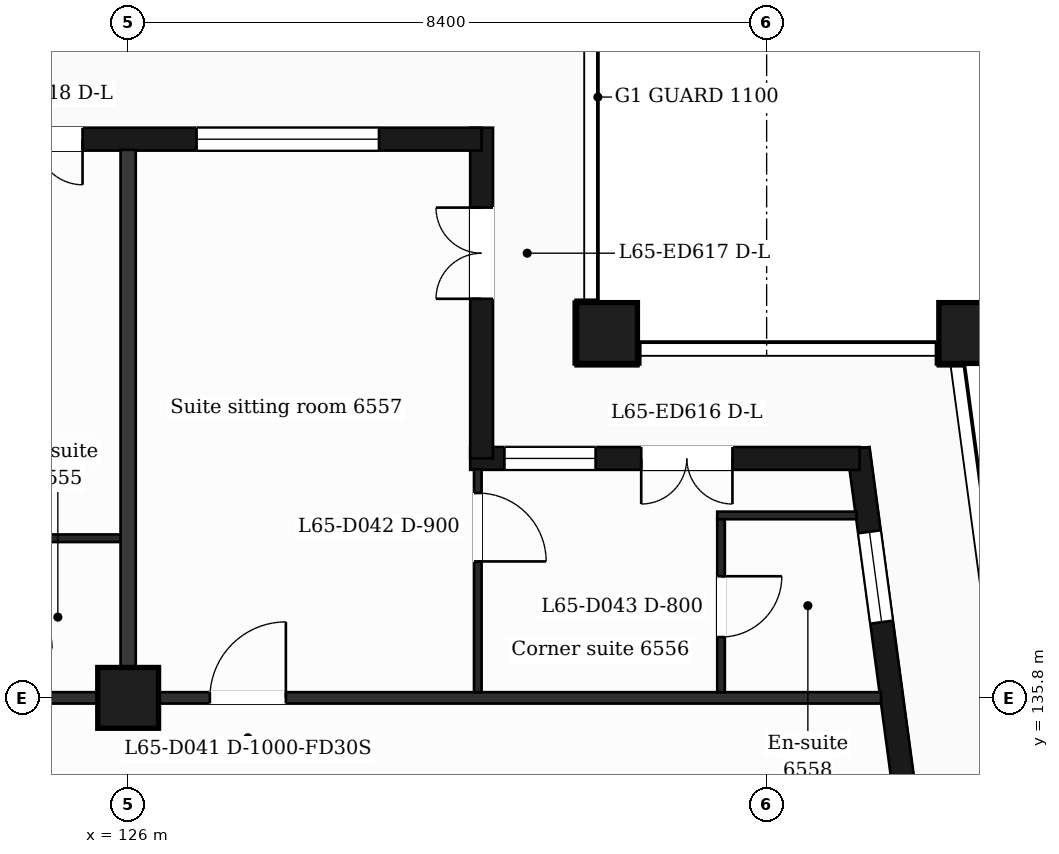
"""IFC4 building model, lengths in metres.
Left out: names, types, materials, properties, quantities, classifications, styles, units other than length and angle.
Written with IfcOpenShell. Run it as: python <this file> out.ifc"""

import sys

from ifc_helpers import new_model, si_unit, direction, frame, frame_2d, origin, origin_2d, place, context, subcontext, project, spatial, rectangle, extrude, element, fill, save


model = new_model("IFC4")
c1 = context("Model", 3, precision=1e-05, world=origin(), true_north=direction((0.0, 1.0)))
c2 = subcontext(c1, "Body", "Model", "MODEL_VIEW")
j1 = project(units=[si_unit("LENGTHUNIT", "METRE"), si_unit("PLANEANGLEUNIT", "RADIAN")], contexts=[c1])
p1 = place(None, origin())
s1 = spatial("IfcSite", under=j1, at=p1, CompositionType="ELEMENT")
p2 = place(p1, origin())
s2 = spatial("IfcBuilding", under=s1, at=p2, CompositionType="ELEMENT")
p3 = place(p2, frame((0.0, 0.0, 270.1)))
s3 = spatial("IfcBuildingStorey", under=s2, at=p3, CompositionType="ELEMENT", Elevation=270.1)
for number, where, z_axis, x_axis in (
    (1, (132.3, 140.6, 0.0), (0.0, 0.0, 1.0), (1.0, 0.0, 0.0)),
    (2, (137.065, 140.6, 0.0), (0.0, 0.0, 1.0), (1.0, 0.0, 0.0)),
    (3, (126.0, 135.8, 0.0), (0.0, 0.0, 1.0), (1.0, 0.0, 0.0)),
):
    element("IfcColumn", number, at=place(p3, frame(where, z_axis=z_axis, x_axis=x_axis)), inside=s3, PredefinedType="COLUMN", context=c2, shape_type="SweptSolid", body=[
        extrude(rectangle(XDim=0.8, YDim=0.8, at=origin_2d()), origin(), (0.0, 0.0, 1.0), 3.7),
    ])
p4 = place(p3, frame((136.504, 132.4, 0.0), z_axis=(0.0, 0.0, 1.0), x_axis=(-0.133399697462, 0.99106231929, 0.0)))
e4 = element("IfcWall", 4, at=p4, inside=s3, PredefinedType="SOLIDWALL", context=c2, shape_type="SweptSolid", body=[
    extrude(rectangle(XDim=6.74, YDim=0.3, at=frame_2d((3.37, 0.0))), origin(), (0.0, 0.0, 1.0), 3.38),
])
p5 = place(p4, frame((1.115, 0.0, 0.0)))
e5 = element("IfcOpeningElement", 5, at=p5, cuts=e4, PredefinedType="OPENING", context=c2, shape_type="SweptSolid", body=[
    extrude(rectangle(XDim=1.2, YDim=2.4, at=frame_2d((0.6, 1.2))), frame((0.0, 0.16, 0.0), z_axis=(0.0, -1.0, 0.0), x_axis=(1.0, 0.0, 0.0)), (0.0, 0.0, 1.0), 0.32),
])
p6 = place(p4, frame((4.436, 0.0, 0.9)))
e6 = element("IfcOpeningElement", 6, at=p6, cuts=e4, PredefinedType="OPENING", context=c2, shape_type="SweptSolid", body=[
    extrude(rectangle(XDim=1.2, YDim=2.1, at=frame_2d((0.6, 1.05))), frame((0.0, 0.16, 0.0), z_axis=(0.0, -1.0, 0.0), x_axis=(1.0, 0.0, 0.0)), (0.0, 0.0, 1.0), 0.32),
])
p7 = place(p3, frame((135.623, 138.95, 0.0), z_axis=(0.0, 0.0, 1.0), x_axis=(-1.0, 0.0, 0.0)))
e7 = element("IfcWall", 7, at=p7, inside=s3, PredefinedType="SOLIDWALL", context=c2, shape_type="SweptSolid", body=[
    extrude(rectangle(XDim=5.123, YDim=0.3, at=frame_2d((2.561, 0.0))), origin(), (0.0, 0.0, 1.0), 3.38),
])
p8 = place(p7, frame((1.673, 0.0, 0.0)))
e8 = element("IfcOpeningElement", 8, at=p8, cuts=e7, PredefinedType="OPENING", context=c2, shape_type="SweptSolid", body=[
    extrude(rectangle(XDim=1.2, YDim=2.4, at=frame_2d((0.6, 1.2))), frame((0.0, 0.16, 0.0), z_axis=(0.0, -1.0, 0.0), x_axis=(1.0, 0.0, 0.0)), (0.0, 0.0, 1.0), 0.32),
])
p9 = place(p7, frame((3.473, 0.0, 0.9)))
e9 = element("IfcOpeningElement", 9, at=p9, cuts=e7, PredefinedType="OPENING", context=c2, shape_type="SweptSolid", body=[
    extrude(rectangle(XDim=1.2, YDim=2.1, at=frame_2d((0.6, 1.05))), frame((0.0, 0.16, 0.0), z_axis=(0.0, -1.0, 0.0), x_axis=(1.0, 0.0, 0.0)), (0.0, 0.0, 1.0), 0.32),
])
p10 = place(p3, frame((130.65, 138.95, 0.0), z_axis=(0.0, 0.0, 1.0), x_axis=(0.0, 1.0, 0.0)))
e10 = element("IfcWall", 10, at=p10, inside=s3, PredefinedType="SOLIDWALL", context=c2, shape_type="SweptSolid", body=[
    extrude(rectangle(XDim=4.35, YDim=0.3, at=frame_2d((2.175, 0.0))), origin(), (0.0, 0.0, 1.0), 3.38),
])
p11 = place(p10, frame((2.1, 0.0, 0.0)))
e11 = element("IfcOpeningElement", 11, at=p11, cuts=e10, PredefinedType="OPENING", context=c2, shape_type="SweptSolid", body=[
    extrude(rectangle(XDim=1.2, YDim=2.4, at=frame_2d((0.6, 1.2))), frame((0.0, 0.16, 0.0), z_axis=(0.0, -1.0, 0.0), x_axis=(1.0, 0.0, 0.0)), (0.0, 0.0, 1.0), 0.32),
])
p12 = place(p3, frame((130.65, 143.15, 0.0), z_axis=(0.0, 0.0, 1.0), x_axis=(-1.0, 0.0, 0.0)))
e12 = element("IfcWall", 12, at=p12, inside=s3, PredefinedType="SOLIDWALL", context=c2, shape_type="SweptSolid", body=[
    extrude(rectangle(XDim=14.25, YDim=0.3, at=frame_2d((7.125, 0.0))), origin(), (0.0, 0.0, 1.0), 3.38),
])
p13 = place(p12, frame((1.35, 0.0, 0.9)))
e13 = element("IfcOpeningElement", 13, at=p13, cuts=e12, PredefinedType="OPENING", context=c2, shape_type="SweptSolid", body=[
    extrude(rectangle(XDim=2.4, YDim=2.1, at=frame_2d((1.2, 1.05))), frame((0.0, 0.16, 0.0), z_axis=(0.0, -1.0, 0.0), x_axis=(1.0, 0.0, 0.0)), (0.0, 0.0, 1.0), 0.32),
])
p14 = place(p12, frame((5.25, 0.0, 0.0)))
e14 = element("IfcOpeningElement", 14, at=p14, cuts=e12, PredefinedType="OPENING", context=c2, shape_type="SweptSolid", body=[
    extrude(rectangle(XDim=1.2, YDim=2.4, at=frame_2d((0.6, 1.2))), frame((0.0, 0.16, 0.0), z_axis=(0.0, -1.0, 0.0), x_axis=(1.0, 0.0, 0.0)), (0.0, 0.0, 1.0), 0.32),
])
p15 = place(p12, frame((7.05, 0.0, 0.9)))
e15 = element("IfcOpeningElement", 15, at=p15, cuts=e12, PredefinedType="OPENING", context=c2, shape_type="SweptSolid", body=[
    extrude(rectangle(XDim=1.2, YDim=2.1, at=frame_2d((0.6, 1.05))), frame((0.0, 0.16, 0.0), z_axis=(0.0, -1.0, 0.0), x_axis=(1.0, 0.0, 0.0)), (0.0, 0.0, 1.0), 0.32),
])
p16 = place(p12, frame((10.35, 0.0, 0.9)))
e16 = element("IfcOpeningElement", 16, at=p16, cuts=e12, PredefinedType="OPENING", context=c2, shape_type="SweptSolid", body=[
    extrude(rectangle(XDim=1.2, YDim=2.1, at=frame_2d((0.6, 1.05))), frame((0.0, 0.16, 0.0), z_axis=(0.0, -1.0, 0.0), x_axis=(1.0, 0.0, 0.0)), (0.0, 0.0, 1.0), 0.32),
])
p17 = place(p3, frame((90.895, 135.8, 0.0), z_axis=(0.0, 0.0, 1.0), x_axis=(1.0, 0.0, 0.0)))
e17 = element("IfcWall", 17, at=p17, inside=s3, PredefinedType="PARTITIONING", context=c2, shape_type="SweptSolid", body=[
    extrude(rectangle(XDim=45.011, YDim=0.15, at=frame_2d((22.505, 0.0))), origin(), (0.0, 0.0, 1.0), 3.38),
])
p18 = place(p17, frame((8.005, 0.0, 0.0)))
e18 = element("IfcOpeningElement", 18, at=p18, cuts=e17, PredefinedType="OPENING", context=c2, shape_type="SweptSolid", body=[
    extrude(rectangle(XDim=1.0, YDim=2.1, at=frame_2d((0.5, 1.05))), frame((0.0, 0.085, 0.0), z_axis=(0.0, -1.0, 0.0), x_axis=(1.0, 0.0, 0.0)), (0.0, 0.0, 1.0), 0.17),
])
p19 = place(p17, frame((10.515, 0.0, 0.0)))
e19 = element("IfcOpeningElement", 19, at=p19, cuts=e17, PredefinedType="OPENING", context=c2, shape_type="SweptSolid", body=[
    extrude(rectangle(XDim=1.0, YDim=2.1, at=frame_2d((0.5, 1.05))), frame((0.0, 0.085, 0.0), z_axis=(0.0, -1.0, 0.0), x_axis=(1.0, 0.0, 0.0)), (0.0, 0.0, 1.0), 0.17),
])
p20 = place(p17, frame((20.156, 0.0, 0.0)))
e20 = element("IfcOpeningElement", 20, at=p20, cuts=e17, PredefinedType="OPENING", context=c2, shape_type="SweptSolid", body=[
    extrude(rectangle(XDim=1.0, YDim=2.1, at=frame_2d((0.5, 1.05))), frame((0.0, 0.085, 0.0), z_axis=(0.0, -1.0, 0.0), x_axis=(1.0, 0.0, 0.0)), (0.0, 0.0, 1.0), 0.17),
])
p21 = place(p17, frame((24.13, 0.0, 0.0)))
e21 = element("IfcOpeningElement", 21, at=p21, cuts=e17, PredefinedType="OPENING", context=c2, shape_type="SweptSolid", body=[
    extrude(rectangle(XDim=0.95, YDim=2.1, at=frame_2d((0.475, 1.05))), frame((0.0, 0.085, 0.0), z_axis=(0.0, -1.0, 0.0), x_axis=(1.0, 0.0, 0.0)), (0.0, 0.0, 1.0), 0.17),
])
p22 = place(p17, frame((29.492, 0.0, 0.0)))
e22 = element("IfcOpeningElement", 22, at=p22, cuts=e17, PredefinedType="OPENING", context=c2, shape_type="SweptSolid", body=[
    extrude(rectangle(XDim=0.95, YDim=2.1, at=frame_2d((0.475, 1.05))), frame((0.0, 0.085, 0.0), z_axis=(0.0, -1.0, 0.0), x_axis=(1.0, 0.0, 0.0)), (0.0, 0.0, 1.0), 0.17),
])
p23 = place(p17, frame((31.705, 0.0, 0.0)))
e23 = element("IfcOpeningElement", 23, at=p23, cuts=e17, PredefinedType="OPENING", context=c2, shape_type="SweptSolid", body=[
    extrude(rectangle(XDim=0.95, YDim=2.1, at=frame_2d((0.475, 1.05))), frame((0.0, 0.085, 0.0), z_axis=(0.0, -1.0, 0.0), x_axis=(1.0, 0.0, 0.0)), (0.0, 0.0, 1.0), 0.17),
])
p24 = place(p17, frame((36.18, 0.0, 0.0)))
e24 = element("IfcOpeningElement", 24, at=p24, cuts=e17, PredefinedType="OPENING", context=c2, shape_type="SweptSolid", body=[
    extrude(rectangle(XDim=1.0, YDim=2.1, at=frame_2d((0.5, 1.05))), frame((0.0, 0.085, 0.0), z_axis=(0.0, -1.0, 0.0), x_axis=(1.0, 0.0, 0.0)), (0.0, 0.0, 1.0), 0.17),
])
p25 = place(p3, frame((124.15, 137.9, 0.0), z_axis=(0.0, 0.0, 1.0), x_axis=(1.0, 0.0, 0.0)))
e25 = element("IfcWall", 25, at=p25, inside=s3, PredefinedType="PARTITIONING", context=c2, shape_type="SweptSolid", body=[
    extrude(rectangle(XDim=1.85, YDim=0.1, at=frame_2d((0.925, 0.0))), origin(), (0.0, 0.0, 1.0), 3.38),
])
p26 = place(p3, frame((133.75, 138.2, 0.0), z_axis=(0.0, 0.0, 1.0), x_axis=(1.0, 0.0, 0.0)))
e26 = element("IfcWall", 26, at=p26, inside=s3, PredefinedType="PARTITIONING", context=c2, shape_type="SweptSolid", body=[
    extrude(rectangle(XDim=1.832, YDim=0.1, at=frame_2d((0.916, 0.0))), origin(), (0.0, 0.0, 1.0), 3.38),
])
p27 = place(p3, frame((126.0, 135.875, 0.0), z_axis=(0.0, 0.0, 1.0), x_axis=(0.0, 1.0, 0.0)))
e27 = element("IfcWall", 27, at=p27, inside=s3, PredefinedType="PARTITIONING", context=c2, shape_type="SweptSolid", body=[
    extrude(rectangle(XDim=7.135, YDim=0.2, at=frame_2d((3.567, 0.0))), origin(), (0.0, 0.0, 1.0), 3.38),
])
p28 = place(p3, frame((130.6, 135.875, 0.0), z_axis=(0.0, 0.0, 1.0), x_axis=(0.0, 1.0, 0.0)))
e28 = element("IfcWall", 28, at=p28, inside=s3, PredefinedType="PARTITIONING", context=c2, shape_type="SweptSolid", body=[
    extrude(rectangle(XDim=2.935, YDim=0.1, at=frame_2d((1.468, 0.0))), origin(), (0.0, 0.0, 1.0), 3.38),
])
p29 = place(p28, frame((1.72, 0.0, 0.0)))
e29 = element("IfcOpeningElement", 29, at=p29, cuts=e28, PredefinedType="OPENING", context=c2, shape_type="SweptSolid", body=[
    extrude(rectangle(XDim=0.9, YDim=2.1, at=frame_2d((0.45, 1.05))), frame((0.0, 0.06, 0.0), z_axis=(0.0, -1.0, 0.0), x_axis=(1.0, 0.0, 0.0)), (0.0, 0.0, 1.0), 0.12),
])
p30 = place(p3, frame((133.8, 135.875, 0.0), z_axis=(0.0, 0.0, 1.0), x_axis=(0.0, 1.0, 0.0)))
e30 = element("IfcWall", 30, at=p30, inside=s3, PredefinedType="PARTITIONING", context=c2, shape_type="SweptSolid", body=[
    extrude(rectangle(XDim=2.275, YDim=0.1, at=frame_2d((1.137, 0.0))), origin(), (0.0, 0.0, 1.0), 3.38),
])
p31 = place(p30, frame((0.725, 0.0, 0.0)))
e31 = element("IfcOpeningElement", 31, at=p31, cuts=e30, PredefinedType="OPENING", context=c2, shape_type="SweptSolid", body=[
    extrude(rectangle(XDim=0.8, YDim=2.1, at=frame_2d((0.4, 1.05))), frame((0.0, 0.06, 0.0), z_axis=(0.0, -1.0, 0.0), x_axis=(1.0, 0.0, 0.0)), (0.0, 0.0, 1.0), 0.12),
])
p32 = place(p6, origin())
e32 = element("IfcWindow", 32, at=p32, inside=s3, PartitioningType="SINGLE_PANEL", PredefinedType="WINDOW", context=c2, shape_type="SweptSolid", body=[
    extrude(rectangle(XDim=1.2, YDim=2.1, at=frame_2d((0.6, 1.05))), frame((0.0, 0.03, 0.0), z_axis=(0.0, -1.0, 0.0), x_axis=(1.0, 0.0, 0.0)), (0.0, 0.0, 1.0), 0.06),
])
fill(e6, e32)
p33 = place(p8, origin())
e33 = element("IfcDoor", 33, at=p33, inside=s3, OperationType="DOUBLE_DOOR_SINGLE_SWING", PredefinedType="DOOR", context=c2, shape_type="SweptSolid", body=[
    extrude(rectangle(XDim=1.2, YDim=2.4, at=frame_2d((0.6, 1.2))), frame((0.0, 0.025, 0.0), z_axis=(0.0, -1.0, 0.0), x_axis=(1.0, 0.0, 0.0)), (0.0, 0.0, 1.0), 0.05),
])
fill(e8, e33)
p34 = place(p9, origin())
e34 = element("IfcWindow", 34, at=p34, inside=s3, PartitioningType="SINGLE_PANEL", PredefinedType="WINDOW", context=c2, shape_type="SweptSolid", body=[
    extrude(rectangle(XDim=1.2, YDim=2.1, at=frame_2d((0.6, 1.05))), frame((0.0, 0.03, 0.0), z_axis=(0.0, -1.0, 0.0), x_axis=(1.0, 0.0, 0.0)), (0.0, 0.0, 1.0), 0.06),
])
fill(e9, e34)
p35 = place(p11, origin())
e35 = element("IfcDoor", 35, at=p35, inside=s3, OperationType="DOUBLE_DOOR_SINGLE_SWING", PredefinedType="DOOR", context=c2, shape_type="SweptSolid", body=[
    extrude(rectangle(XDim=1.2, YDim=2.4, at=frame_2d((0.6, 1.2))), frame((0.0, 0.025, 0.0), z_axis=(0.0, -1.0, 0.0), x_axis=(1.0, 0.0, 0.0)), (0.0, 0.0, 1.0), 0.05),
])
fill(e11, e35)
p36 = place(p13, origin())
e36 = element("IfcWindow", 36, at=p36, inside=s3, PartitioningType="SINGLE_PANEL", PredefinedType="WINDOW", context=c2, shape_type="SweptSolid", body=[
    extrude(rectangle(XDim=2.4, YDim=2.1, at=frame_2d((1.2, 1.05))), frame((0.0, 0.03, 0.0), z_axis=(0.0, -1.0, 0.0), x_axis=(1.0, 0.0, 0.0)), (0.0, 0.0, 1.0), 0.06),
])
fill(e13, e36)
p37 = place(p14, origin())
e37 = element("IfcDoor", 37, at=p37, inside=s3, OperationType="DOUBLE_DOOR_SINGLE_SWING", PredefinedType="DOOR", context=c2, shape_type="SweptSolid", body=[
    extrude(rectangle(XDim=1.2, YDim=2.4, at=frame_2d((0.6, 1.2))), frame((0.0, 0.025, 0.0), z_axis=(0.0, -1.0, 0.0), x_axis=(1.0, 0.0, 0.0)), (0.0, 0.0, 1.0), 0.05),
])
fill(e14, e37)
p38 = place(p24, origin())
e38 = element("IfcDoor", 38, at=p38, inside=s3, OperationType="SINGLE_SWING_RIGHT", PredefinedType="DOOR", context=c2, shape_type="SweptSolid", body=[
    extrude(rectangle(XDim=1.0, YDim=2.1, at=frame_2d((0.5, 1.05))), frame((0.0, 0.025, 0.0), z_axis=(0.0, -1.0, 0.0), x_axis=(1.0, 0.0, 0.0)), (0.0, 0.0, 1.0), 0.05),
])
fill(e24, e38)
p39 = place(p29, origin())
e39 = element("IfcDoor", 39, at=p39, inside=s3, OperationType="SINGLE_SWING_LEFT", PredefinedType="DOOR", context=c2, shape_type="SweptSolid", body=[
    extrude(rectangle(XDim=0.9, YDim=2.1, at=frame_2d((0.45, 1.05))), frame((0.0, 0.025, 0.0), z_axis=(0.0, -1.0, 0.0), x_axis=(1.0, 0.0, 0.0)), (0.0, 0.0, 1.0), 0.05),
])
fill(e29, e39)
p40 = place(p31, origin())
e40 = element("IfcDoor", 40, at=p40, inside=s3, OperationType="SINGLE_SWING_RIGHT", PredefinedType="DOOR", context=c2, shape_type="SweptSolid", body=[
    extrude(rectangle(XDim=0.8, YDim=2.1, at=frame_2d((0.4, 1.05))), frame((0.0, 0.025, 0.0), z_axis=(0.0, -1.0, 0.0), x_axis=(1.0, 0.0, 0.0)), (0.0, 0.0, 1.0), 0.05),
])
fill(e31, e40)
save(model, sys.argv[1])
